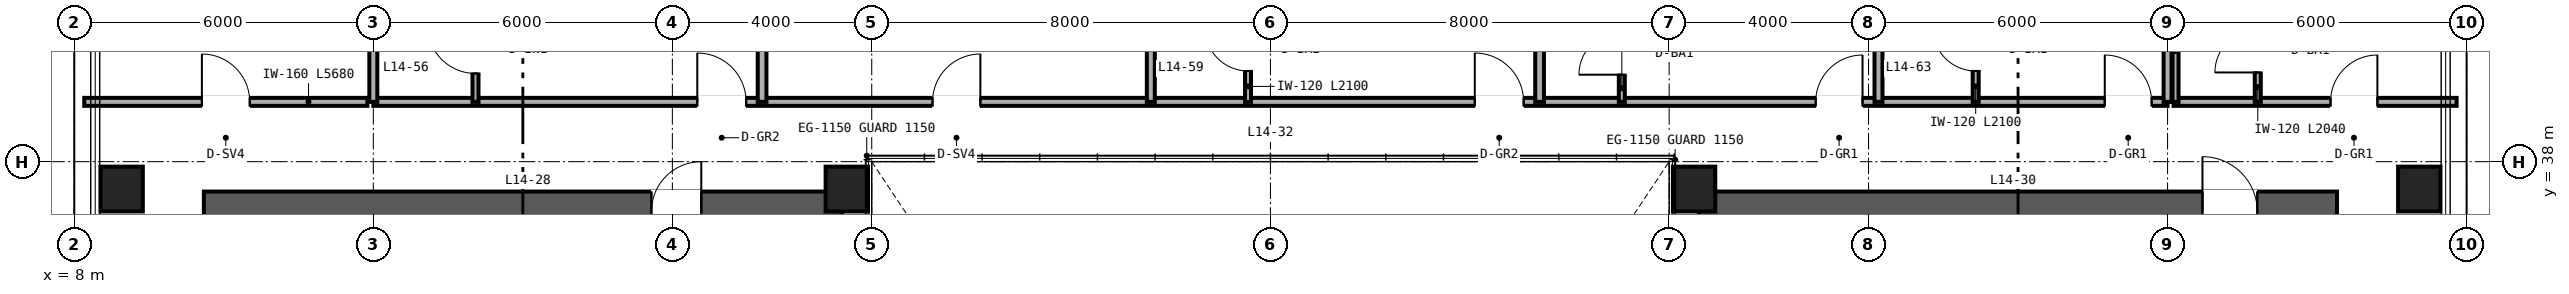
"""IFC4 building model, lengths in metres.
Left out: names, types, materials, properties, quantities, classifications, styles, units other than length and angle.
Written with IfcOpenShell. Run it as: python <this file> out.ifc"""

import sys

from ifc_helpers import new_model, si_unit, direction, frame, frame_2d, origin, origin_2d, place, context, subcontext, project, spatial, rectangle, hollow_rectangle, extrude, source, transform, mapped, element, fill, save


model = new_model("IFC4")
c1 = context("Model", 3, precision=1e-05, world=origin(), true_north=direction((0.0, 1.0)))
c2 = subcontext(c1, "Body", "Model", "MODEL_VIEW")
j1 = project(units=[si_unit("LENGTHUNIT", "METRE"), si_unit("PLANEANGLEUNIT", "RADIAN")], contexts=[c1])
p1 = place(None, origin())
s1 = spatial("IfcSite", under=j1, at=p1, CompositionType="ELEMENT")
p2 = place(p1, origin())
s2 = spatial("IfcBuilding", under=s1, at=p2, CompositionType="ELEMENT")
p3 = place(p2, frame((0.0, 0.0, 60.0)))
s3 = spatial("IfcBuildingStorey", under=s2, at=p3, CompositionType="ELEMENT", Elevation=60.0)
p4 = place(p3, frame((10.6, 37.0, 0.0), z_axis=(0.0, 0.0, 1.0), x_axis=(1.0, 0.0, 0.0)))
e1 = element("IfcWall", 1, at=p4, inside=s3, PredefinedType="SHEAR", context=c2, shape_type="SweptSolid", body=[
    extrude(rectangle(XDim=12.8, YDim=0.8, at=frame_2d((6.4, 0.0))), origin(), (0.0, 0.0, 1.0), 3.35),
])
p5 = place(p4, frame((8.98, 0.0, 0.0)))
e2 = element("IfcOpeningElement", 2, at=p5, cuts=e1, PredefinedType="OPENING", context=c2, shape_type="SweptSolid", body=[
    extrude(rectangle(XDim=1.0, YDim=2.15, at=frame_2d((0.5, 1.075))), frame((0.0, 0.41, 0.0), z_axis=(0.0, -1.0, 0.0), x_axis=(1.0, 0.0, 0.0)), (0.0, 0.0, 1.0), 0.82),
])
p6 = place(p3, frame((40.6, 37.0, 0.0), z_axis=(0.0, 0.0, 1.0), x_axis=(1.0, 0.0, 0.0)))
e3 = element("IfcWall", 3, at=p6, inside=s3, PredefinedType="SHEAR", context=c2, shape_type="SweptSolid", body=[
    extrude(rectangle(XDim=12.8, YDim=0.8, at=frame_2d((6.4, 0.0))), origin(), (0.0, 0.0, 1.0), 3.35),
])
p7 = place(p6, frame((10.1, 0.0, 0.0)))
e4 = element("IfcOpeningElement", 4, at=p7, cuts=e3, PredefinedType="OPENING", context=c2, shape_type="SweptSolid", body=[
    extrude(rectangle(XDim=1.1, YDim=2.15, at=frame_2d((0.55, 1.075))), frame((0.0, 0.41, 0.0), z_axis=(0.0, -1.0, 0.0), x_axis=(1.0, 0.0, 0.0)), (0.0, 0.0, 1.0), 0.82),
])
m1 = source(origin(), c2, "Body", "SweptSolid", [
    extrude(hollow_rectangle(XDim=0.85, YDim=0.9, WallThickness=0.04, at=origin_2d()), origin(), (0.0, 0.0, 1.0), 3.35),
])
for number, where, z_axis, x_axis in (
    (5, (8.95, 37.45, 0.0), (0.0, 0.0, 1.0), (1.0, 0.0, 0.0)),
    (6, (23.5, 37.45, 0.0), (0.0, 0.0, 1.0), (1.0, 0.0, 0.0)),
    (7, (40.5, 37.45, 0.0), (0.0, 0.0, 1.0), (1.0, 0.0, 0.0)),
    (8, (55.05, 37.45, 0.0), (0.0, 0.0, 1.0), (1.0, 0.0, 0.0)),
):
    element("IfcColumn", number, at=place(p3, frame(where, z_axis=z_axis, x_axis=x_axis)), inside=s3, PredefinedType="COLUMN", context=c2, shape_type="MappedRepresentation", body=[
        mapped(m1, transform((0.0, 0.0, 0.0), scale=1.0)),
    ])
p8 = place(p3, frame((8.2, 39.2, 0.0), z_axis=(0.0, 0.0, 1.0), x_axis=(1.0, 0.0, 0.0)))
e9 = element("IfcWall", 9, at=p8, inside=s3, PredefinedType="PARTITIONING", context=c2, shape_type="SweptSolid", body=[
    extrude(rectangle(XDim=5.68, YDim=0.16, at=frame_2d((2.84, 0.0))), origin(), (0.0, 0.0, 1.0), 3.35),
])
p9 = place(p8, frame((2.36, 0.0, 0.0)))
e10 = element("IfcOpeningElement", 10, at=p9, cuts=e9, PredefinedType="OPENING", context=c2, shape_type="SweptSolid", body=[
    extrude(rectangle(XDim=0.96, YDim=2.15, at=frame_2d((0.48, 1.075))), frame((0.0, 0.09, 0.0), z_axis=(0.0, -1.0, 0.0), x_axis=(1.0, 0.0, 0.0)), (0.0, 0.0, 1.0), 0.18),
])
p10 = place(p3, frame((50.12, 39.2, 0.0), z_axis=(0.0, 0.0, 1.0), x_axis=(1.0, 0.0, 0.0)))
e11 = element("IfcWall", 11, at=p10, inside=s3, PredefinedType="PARTITIONING", context=c2, shape_type="SweptSolid", body=[
    extrude(rectangle(XDim=5.68, YDim=0.16, at=frame_2d((2.84, 0.0))), origin(), (0.0, 0.0, 1.0), 3.35),
])
p11 = place(p10, frame((3.15, 0.0, 0.0)))
e12 = element("IfcOpeningElement", 12, at=p11, cuts=e11, PredefinedType="OPENING", context=c2, shape_type="SweptSolid", body=[
    extrude(rectangle(XDim=0.94, YDim=2.15, at=frame_2d((0.47, 1.075))), frame((0.0, 0.09, 0.0), z_axis=(0.0, -1.0, 0.0), x_axis=(1.0, 0.0, 0.0)), (0.0, 0.0, 1.0), 0.18),
])
p12 = place(p3, frame((51.81, 39.2, 0.0), z_axis=(0.0, 0.0, 1.0), x_axis=(0.0, 1.0, 0.0)))
e13 = element("IfcWall", 13, at=p12, inside=s3, PredefinedType="PARTITIONING", context=c2, shape_type="SweptSolid", body=[
    extrude(rectangle(XDim=2.04, YDim=0.12, at=frame_2d((1.02, 0.0))), origin(), (0.0, 0.0, 1.0), 3.35),
])
p13 = place(p12, frame((0.59, 0.0, 0.0)))
e14 = element("IfcOpeningElement", 14, at=p13, cuts=e13, PredefinedType="OPENING", context=c2, shape_type="SweptSolid", body=[
    extrude(rectangle(XDim=0.86, YDim=2.1, at=frame_2d((0.43, 1.05))), frame((0.0, 0.07, 0.0), z_axis=(0.0, -1.0, 0.0), x_axis=(1.0, 0.0, 0.0)), (0.0, 0.0, 1.0), 0.14),
])
p14 = place(p3, frame((50.16, 39.2, 0.0), z_axis=(0.0, 0.0, 1.0), x_axis=(0.0, 1.0, 0.0)))
e15 = element("IfcWall", 15, at=p14, inside=s3, PredefinedType="PARTITIONING", context=c2, shape_type="SweptSolid", body=[
    extrude(rectangle(XDim=2.04, YDim=0.12, at=frame_2d((1.02, 0.0))), origin(), (0.0, 0.0, 1.0), 3.35),
])
p15 = place(p3, frame((14.0, 39.2, 0.0), z_axis=(0.0, 0.0, 1.0), x_axis=(1.0, 0.0, 0.0)))
e16 = element("IfcWall", 16, at=p15, inside=s3, PredefinedType="PARTITIONING", context=c2, shape_type="SweptSolid", body=[
    extrude(rectangle(XDim=36.0, YDim=0.16, at=frame_2d((18.0, 0.0))), origin(), (0.0, 0.0, 1.0), 2.571),
])
p16 = place(p15, frame((6.5, 0.0, 0.0)))
e17 = element("IfcOpeningElement", 17, at=p16, cuts=e16, PredefinedType="OPENING", context=c2, shape_type="SweptSolid", body=[
    extrude(rectangle(XDim=0.98, YDim=2.2, at=frame_2d((0.49, 1.1))), frame((0.0, 0.09, 0.0), z_axis=(0.0, -1.0, 0.0), x_axis=(1.0, 0.0, 0.0)), (0.0, 0.0, 1.0), 0.18),
])
p17 = place(p15, frame((11.22, 0.0, 0.0)))
e18 = element("IfcOpeningElement", 18, at=p17, cuts=e16, PredefinedType="OPENING", context=c2, shape_type="SweptSolid", body=[
    extrude(rectangle(XDim=0.96, YDim=2.15, at=frame_2d((0.48, 1.075))), frame((0.0, 0.09, 0.0), z_axis=(0.0, -1.0, 0.0), x_axis=(1.0, 0.0, 0.0)), (0.0, 0.0, 1.0), 0.18),
])
p18 = place(p15, frame((22.1, 0.0, 0.0)))
e19 = element("IfcOpeningElement", 19, at=p18, cuts=e16, PredefinedType="OPENING", context=c2, shape_type="SweptSolid", body=[
    extrude(rectangle(XDim=0.98, YDim=2.2, at=frame_2d((0.49, 1.1))), frame((0.0, 0.09, 0.0), z_axis=(0.0, -1.0, 0.0), x_axis=(1.0, 0.0, 0.0)), (0.0, 0.0, 1.0), 0.18),
])
p19 = place(p15, frame((28.94, 0.0, 0.0)))
e20 = element("IfcOpeningElement", 20, at=p19, cuts=e16, PredefinedType="OPENING", context=c2, shape_type="SweptSolid", body=[
    extrude(rectangle(XDim=0.94, YDim=2.15, at=frame_2d((0.47, 1.075))), frame((0.0, 0.09, 0.0), z_axis=(0.0, -1.0, 0.0), x_axis=(1.0, 0.0, 0.0)), (0.0, 0.0, 1.0), 0.18),
])
p20 = place(p15, frame((34.74, 0.0, 0.0)))
e21 = element("IfcOpeningElement", 21, at=p20, cuts=e16, PredefinedType="OPENING", context=c2, shape_type="SweptSolid", body=[
    extrude(rectangle(XDim=0.94, YDim=2.15, at=frame_2d((0.47, 1.075))), frame((0.0, 0.09, 0.0), z_axis=(0.0, -1.0, 0.0), x_axis=(1.0, 0.0, 0.0)), (0.0, 0.0, 1.0), 0.18),
])
for number, where, z_axis, x_axis in (
    (22, (14.0, 39.2, 0.0), (0.0, 0.0, 1.0), (0.0, 1.0, 0.0)),
    (23, (50.0, 39.2, 0.0), (0.0, 0.0, 1.0), (0.0, 1.0, 0.0)),
):
    element("IfcWall", number, at=place(p3, frame(where, z_axis=z_axis, x_axis=x_axis)), inside=s3, PredefinedType="PARTITIONING", context=c2, shape_type="SweptSolid", body=[
        extrude(rectangle(XDim=10.44, YDim=0.16, at=frame_2d((5.22, 0.0))), origin(), (0.0, 0.0, 1.0), 2.657),
    ])
p21 = place(p3, frame((21.8, 39.2, 0.0), z_axis=(0.0, 0.0, 1.0), x_axis=(0.0, 1.0, 0.0)))
e24 = element("IfcWall", 24, at=p21, inside=s3, PredefinedType="PARTITIONING", context=c2, shape_type="SweptSolid", body=[
    extrude(rectangle(XDim=10.44, YDim=0.175, at=frame_2d((5.22, 0.0))), origin(), (0.0, 0.0, 1.0), 2.813),
])
p22 = place(p3, frame((16.05, 39.2, 0.0), z_axis=(0.0, 0.0, 1.0), x_axis=(0.0, 1.0, 0.0)))
e25 = element("IfcWall", 25, at=p22, inside=s3, PredefinedType="PARTITIONING", context=c2, shape_type="SweptSolid", body=[
    extrude(rectangle(XDim=2.1, YDim=0.12, at=frame_2d((1.05, 0.0))), origin(), (0.0, 0.0, 1.0), 3.35),
])
p23 = place(p22, frame((0.57, 0.0, 0.0)))
e26 = element("IfcOpeningElement", 26, at=p23, cuts=e25, PredefinedType="OPENING", context=c2, shape_type="SweptSolid", body=[
    extrude(rectangle(XDim=0.96, YDim=2.15, at=frame_2d((0.48, 1.075))), frame((0.0, 0.07, 0.0), z_axis=(0.0, -1.0, 0.0), x_axis=(1.0, 0.0, 0.0)), (0.0, 0.0, 1.0), 0.14),
])
p24 = place(p3, frame((29.6, 39.2, 0.0), z_axis=(0.0, 0.0, 1.0), x_axis=(0.0, 1.0, 0.0)))
e27 = element("IfcWall", 27, at=p24, inside=s3, PredefinedType="PARTITIONING", context=c2, shape_type="SweptSolid", body=[
    extrude(rectangle(XDim=10.44, YDim=0.16, at=frame_2d((5.22, 0.0))), origin(), (0.0, 0.0, 1.0), 2.423),
])
p25 = place(p3, frame((37.4, 39.2, 0.0), z_axis=(0.0, 0.0, 1.0), x_axis=(0.0, 1.0, 0.0)))
e28 = element("IfcWall", 28, at=p25, inside=s3, PredefinedType="PARTITIONING", context=c2, shape_type="SweptSolid", body=[
    extrude(rectangle(XDim=10.44, YDim=0.175, at=frame_2d((5.22, 0.0))), origin(), (0.0, 0.0, 1.0), 2.423),
])
p26 = place(p3, frame((31.55, 39.2, 0.0), z_axis=(0.0, 0.0, 1.0), x_axis=(0.0, 1.0, 0.0)))
e29 = element("IfcWall", 29, at=p26, inside=s3, PredefinedType="PARTITIONING", context=c2, shape_type="SweptSolid", body=[
    extrude(rectangle(XDim=2.1, YDim=0.12, at=frame_2d((1.05, 0.0))), origin(), (0.0, 0.0, 1.0), 3.35),
])
p27 = place(p26, frame((0.62, 0.0, 0.0)))
e30 = element("IfcOpeningElement", 30, at=p27, cuts=e29, PredefinedType="OPENING", context=c2, shape_type="SweptSolid", body=[
    extrude(rectangle(XDim=0.86, YDim=2.1, at=frame_2d((0.43, 1.05))), frame((0.0, 0.07, 0.0), z_axis=(0.0, -1.0, 0.0), x_axis=(1.0, 0.0, 0.0)), (0.0, 0.0, 1.0), 0.14),
])
p28 = place(p3, frame((44.2, 39.2, 0.0), z_axis=(0.0, 0.0, 1.0), x_axis=(0.0, 1.0, 0.0)))
e31 = element("IfcWall", 31, at=p28, inside=s3, PredefinedType="PARTITIONING", context=c2, shape_type="SweptSolid", body=[
    extrude(rectangle(XDim=10.44, YDim=0.16, at=frame_2d((5.22, 0.0))), origin(), (0.0, 0.0, 1.0), 2.657),
])
p29 = place(p3, frame((39.05, 39.2, 0.0), z_axis=(0.0, 0.0, 1.0), x_axis=(0.0, 1.0, 0.0)))
e32 = element("IfcWall", 32, at=p29, inside=s3, PredefinedType="PARTITIONING", context=c2, shape_type="SweptSolid", body=[
    extrude(rectangle(XDim=1.95, YDim=0.12, at=frame_2d((0.975, 0.0))), origin(), (0.0, 0.0, 1.0), 3.35),
])
p30 = place(p29, frame((0.545, 0.0, 0.0)))
e33 = element("IfcOpeningElement", 33, at=p30, cuts=e32, PredefinedType="OPENING", context=c2, shape_type="SweptSolid", body=[
    extrude(rectangle(XDim=0.86, YDim=2.1, at=frame_2d((0.43, 1.05))), frame((0.0, 0.07, 0.0), z_axis=(0.0, -1.0, 0.0), x_axis=(1.0, 0.0, 0.0)), (0.0, 0.0, 1.0), 0.14),
])
p31 = place(p3, frame((46.15, 39.2, 0.0), z_axis=(0.0, 0.0, 1.0), x_axis=(0.0, 1.0, 0.0)))
e34 = element("IfcWall", 34, at=p31, inside=s3, PredefinedType="PARTITIONING", context=c2, shape_type="SweptSolid", body=[
    extrude(rectangle(XDim=2.1, YDim=0.12, at=frame_2d((1.05, 0.0))), origin(), (0.0, 0.0, 1.0), 3.35),
])
p32 = place(p31, frame((0.62, 0.0, 0.0)))
e35 = element("IfcOpeningElement", 35, at=p32, cuts=e34, PredefinedType="OPENING", context=c2, shape_type="SweptSolid", body=[
    extrude(rectangle(XDim=0.86, YDim=2.1, at=frame_2d((0.43, 1.05))), frame((0.0, 0.07, 0.0), z_axis=(0.0, -1.0, 0.0), x_axis=(1.0, 0.0, 0.0)), (0.0, 0.0, 1.0), 0.14),
])
m2 = source(origin(), c2, "Body", "SweptSolid", [
    extrude(rectangle(XDim=1.0, YDim=2.15, at=frame_2d((0.5, 1.075))), frame((0.0, 0.025, 0.0), z_axis=(0.0, -1.0, 0.0), x_axis=(1.0, 0.0, 0.0)), (0.0, 0.0, 1.0), 0.05),
])
p33 = place(p5, origin())
e36 = element("IfcDoor", 36, at=p33, inside=s3, OperationType="SINGLE_SWING_RIGHT", PredefinedType="DOOR", context=c2, shape_type="MappedRepresentation", body=[
    mapped(m2, transform((0.0, 0.0, 0.0), scale=1.0)),
])
fill(e2, e36)
m3 = source(origin(), c2, "Body", "SweptSolid", [
    extrude(rectangle(XDim=1.1, YDim=2.15, at=frame_2d((0.55, 1.075))), frame((0.0, 0.025, 0.0), z_axis=(0.0, -1.0, 0.0), x_axis=(1.0, 0.0, 0.0)), (0.0, 0.0, 1.0), 0.05),
])
p34 = place(p7, origin())
e37 = element("IfcDoor", 37, at=p34, inside=s3, OperationType="SINGLE_SWING_LEFT", PredefinedType="DOOR", context=c2, shape_type="MappedRepresentation", body=[
    mapped(m3, transform((0.0, 0.0, 0.0), scale=1.0)),
])
fill(e4, e37)
m4 = source(origin(), c2, "Body", "SweptSolid", [
    extrude(rectangle(XDim=0.96, YDim=2.15, at=frame_2d((0.48, 1.075))), frame((0.0, 0.025, 0.0), z_axis=(0.0, -1.0, 0.0), x_axis=(1.0, 0.0, 0.0)), (0.0, 0.0, 1.0), 0.05),
])
p35 = place(p9, origin())
e38 = element("IfcDoor", 38, at=p35, inside=s3, OperationType="SINGLE_SWING_LEFT", PredefinedType="DOOR", context=c2, shape_type="MappedRepresentation", body=[
    mapped(m4, transform((0.0, 0.0, 0.0), scale=1.0)),
])
fill(e10, e38)
m5 = source(origin(), c2, "Body", "SweptSolid", [
    extrude(rectangle(XDim=0.86, YDim=2.1, at=frame_2d((0.43, 1.05))), frame((0.0, 0.025, 0.0), z_axis=(0.0, -1.0, 0.0), x_axis=(1.0, 0.0, 0.0)), (0.0, 0.0, 1.0), 0.05),
])
p36 = place(p13, origin())
e39 = element("IfcDoor", 39, at=p36, inside=s3, OperationType="SINGLE_SWING_LEFT", PredefinedType="DOOR", context=c2, shape_type="MappedRepresentation", body=[
    mapped(m5, transform((0.0, 0.0, 0.0), scale=1.0)),
])
fill(e14, e39)
m6 = source(origin(), c2, "Body", "SweptSolid", [
    extrude(rectangle(XDim=0.94, YDim=2.15, at=frame_2d((0.47, 1.075))), frame((0.0, 0.025, 0.0), z_axis=(0.0, -1.0, 0.0), x_axis=(1.0, 0.0, 0.0)), (0.0, 0.0, 1.0), 0.05),
])
p37 = place(p11, origin())
e40 = element("IfcDoor", 40, at=p37, inside=s3, OperationType="SINGLE_SWING_RIGHT", PredefinedType="DOOR", context=c2, shape_type="MappedRepresentation", body=[
    mapped(m6, transform((0.0, 0.0, 0.0), scale=1.0)),
])
fill(e12, e40)
p38 = place(p23, origin())
e41 = element("IfcDoor", 41, at=p38, inside=s3, OperationType="SINGLE_SWING_RIGHT", PredefinedType="DOOR", context=c2, shape_type="MappedRepresentation", body=[
    mapped(m4, transform((0.0, 0.0, 0.0), scale=1.0)),
])
fill(e26, e41)
p39 = place(p27, origin())
e42 = element("IfcDoor", 42, at=p39, inside=s3, OperationType="SINGLE_SWING_RIGHT", PredefinedType="DOOR", context=c2, shape_type="MappedRepresentation", body=[
    mapped(m5, transform((0.0, 0.0, 0.0), scale=1.0)),
])
fill(e30, e42)
p40 = place(p30, origin())
e43 = element("IfcDoor", 43, at=p40, inside=s3, OperationType="SINGLE_SWING_LEFT", PredefinedType="DOOR", context=c2, shape_type="MappedRepresentation", body=[
    mapped(m5, transform((0.0, 0.0, 0.0), scale=1.0)),
])
fill(e33, e43)
p41 = place(p32, origin())
e44 = element("IfcDoor", 44, at=p41, inside=s3, OperationType="SINGLE_SWING_RIGHT", PredefinedType="DOOR", context=c2, shape_type="MappedRepresentation", body=[
    mapped(m5, transform((0.0, 0.0, 0.0), scale=1.0)),
])
fill(e35, e44)
m7 = source(origin(), c2, "Body", "SweptSolid", [
    extrude(rectangle(XDim=0.98, YDim=2.2, at=frame_2d((0.49, 1.1))), frame((0.0, 0.025, 0.0), z_axis=(0.0, -1.0, 0.0), x_axis=(1.0, 0.0, 0.0)), (0.0, 0.0, 1.0), 0.05),
])
p42 = place(p16, origin())
e45 = element("IfcDoor", 45, at=p42, inside=s3, OperationType="SINGLE_SWING_LEFT", PredefinedType="DOOR", context=c2, shape_type="MappedRepresentation", body=[
    mapped(m7, transform((0.0, 0.0, 0.0), scale=1.0)),
])
fill(e17, e45)
p43 = place(p17, origin())
e46 = element("IfcDoor", 46, at=p43, inside=s3, OperationType="SINGLE_SWING_RIGHT", PredefinedType="DOOR", context=c2, shape_type="MappedRepresentation", body=[
    mapped(m4, transform((0.0, 0.0, 0.0), scale=1.0)),
])
fill(e18, e46)
p44 = place(p18, origin())
e47 = element("IfcDoor", 47, at=p44, inside=s3, OperationType="SINGLE_SWING_LEFT", PredefinedType="DOOR", context=c2, shape_type="MappedRepresentation", body=[
    mapped(m7, transform((0.0, 0.0, 0.0), scale=1.0)),
])
fill(e19, e47)
p45 = place(p19, origin())
e48 = element("IfcDoor", 48, at=p45, inside=s3, OperationType="SINGLE_SWING_RIGHT", PredefinedType="DOOR", context=c2, shape_type="MappedRepresentation", body=[
    mapped(m6, transform((0.0, 0.0, 0.0), scale=1.0)),
])
fill(e20, e48)
p46 = place(p20, origin())
e49 = element("IfcDoor", 49, at=p46, inside=s3, OperationType="SINGLE_SWING_LEFT", PredefinedType="DOOR", context=c2, shape_type="MappedRepresentation", body=[
    mapped(m6, transform((0.0, 0.0, 0.0), scale=1.0)),
])
fill(e21, e49)
save(model, sys.argv[1])
